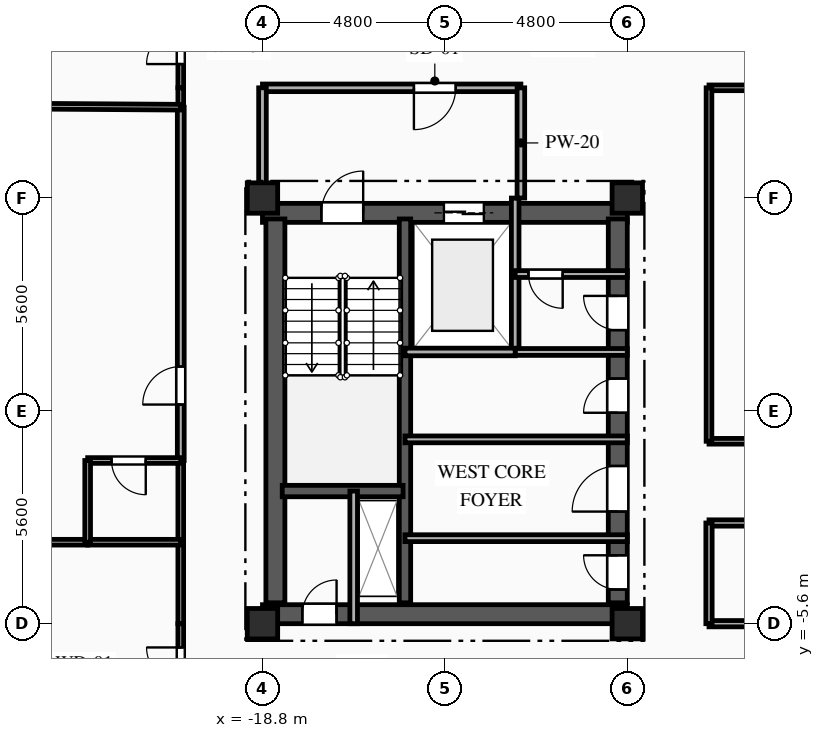
"""IFC4 building model, lengths in metres.
Left out: names, types, materials, properties, quantities, classifications, styles, units other than length and angle.
Written with IfcOpenShell. Run it as: python <this file> out.ifc"""

import sys

from ifc_helpers import new_model, si_unit, direction, frame, frame_2d, origin, origin_2d, place, context, subcontext, project, spatial, rectangle, extrude, element, fill, save


model = new_model("IFC4")
c1 = context("Model", 3, precision=1e-05, world=origin(), true_north=direction((0.0, 1.0)))
c2 = subcontext(c1, "Body", "Model", "MODEL_VIEW")
j1 = project(units=[si_unit("LENGTHUNIT", "METRE"), si_unit("PLANEANGLEUNIT", "RADIAN")], contexts=[c1])
p1 = place(None, origin())
s1 = spatial("IfcSite", under=j1, at=p1, CompositionType="ELEMENT")
p2 = place(p1, origin())
s2 = spatial("IfcBuilding", under=s1, at=p2, CompositionType="ELEMENT")
p3 = place(p2, frame((0.0, 0.0, 206.45)))
s3 = spatial("IfcBuildingStorey", under=s2, at=p3, CompositionType="ELEMENT", Elevation=206.45)
for number, where, z_axis, x_axis in (
    (1, (-18.8, -5.6, 0.0), (0.0, 0.0, 1.0), (1.0, 0.0, 0.0)),
    (2, (-18.8, 5.6, 0.0), (0.0, 0.0, 1.0), (1.0, 0.0, 0.0)),
    (3, (-9.2, -5.6, 0.0), (0.0, 0.0, 1.0), (1.0, 0.0, 0.0)),
    (4, (-9.2, 5.6, 0.0), (0.0, 0.0, 1.0), (1.0, 0.0, 0.0)),
):
    element("IfcColumn", number, at=place(p3, frame(where, z_axis=z_axis, x_axis=x_axis)), inside=s3, PredefinedType="COLUMN", context=c2, shape_type="SweptSolid", body=[
        extrude(rectangle(XDim=0.8, YDim=0.8, at=origin_2d()), origin(), (0.0, 0.0, 1.0), 3.35),
    ])
p4 = place(p3, frame((-18.8, 5.21, 0.0), z_axis=(0.0, 0.0, 1.0), x_axis=(1.0, 0.0, 0.0)))
e5 = element("IfcWall", 5, at=p4, inside=s3, PredefinedType="SHEAR", context=c2, shape_type="SweptSolid", body=[
    extrude(rectangle(XDim=9.6, YDim=0.5, at=frame_2d((4.8, 0.0))), origin(), (0.0, 0.0, 1.0), 3.04),
])
p5 = place(p4, frame((1.55, 0.0, 0.0)))
e6 = element("IfcOpeningElement", 6, at=p5, cuts=e5, PredefinedType="OPENING", context=c2, shape_type="SweptSolid", body=[
    extrude(rectangle(XDim=1.1, YDim=2.15, at=frame_2d((0.55, 1.075))), frame((0.0, 0.26, 0.0), z_axis=(0.0, -1.0, 0.0), x_axis=(1.0, 0.0, 0.0)), (0.0, 0.0, 1.0), 0.52),
])
p6 = place(p4, frame((4.775, 0.0, 0.0)))
e7 = element("IfcOpeningElement", 7, at=p6, cuts=e5, PredefinedType="OPENING", context=c2, shape_type="SweptSolid", body=[
    extrude(rectangle(XDim=1.05, YDim=2.1, at=frame_2d((0.525, 1.05))), frame((0.0, 0.26, 0.0), z_axis=(0.0, -1.0, 0.0), x_axis=(1.0, 0.0, 0.0)), (0.0, 0.0, 1.0), 0.52),
])
p7 = place(p3, frame((-18.8, -5.35, 0.0), z_axis=(0.0, 0.0, 1.0), x_axis=(1.0, 0.0, 0.0)))
e8 = element("IfcWall", 8, at=p7, inside=s3, PredefinedType="SHEAR", context=c2, shape_type="SweptSolid", body=[
    extrude(rectangle(XDim=9.6, YDim=0.5, at=frame_2d((4.8, 0.0))), origin(), (0.0, 0.0, 1.0), 3.04),
])
p8 = place(p7, frame((1.05, 0.0, 0.0)))
e9 = element("IfcOpeningElement", 9, at=p8, cuts=e8, PredefinedType="OPENING", context=c2, shape_type="SweptSolid", body=[
    extrude(rectangle(XDim=0.9, YDim=2.1, at=frame_2d((0.45, 1.05))), frame((0.0, 0.26, 0.0), z_axis=(0.0, -1.0, 0.0), x_axis=(1.0, 0.0, 0.0)), (0.0, 0.0, 1.0), 0.52),
])
p9 = place(p3, frame((-18.46, -5.05, 0.0), z_axis=(0.0, 0.0, 1.0), x_axis=(0.0, 1.0, 0.0)))
e10 = element("IfcWall", 10, at=p9, inside=s3, PredefinedType="SHEAR", context=c2, shape_type="SweptSolid", body=[
    extrude(rectangle(XDim=10.1, YDim=0.5, at=frame_2d((5.05, 0.0))), origin(), (0.0, 0.0, 1.0), 3.04),
])
p10 = place(p3, frame((-9.45, -5.05, 0.0), z_axis=(0.0, 0.0, 1.0), x_axis=(0.0, 1.0, 0.0)))
e11 = element("IfcWall", 11, at=p10, inside=s3, PredefinedType="SHEAR", context=c2, shape_type="SweptSolid", body=[
    extrude(rectangle(XDim=10.1, YDim=0.5, at=frame_2d((5.05, 0.0))), origin(), (0.0, 0.0, 1.0), 3.04),
])
p11 = place(p10, frame((7.175, 0.0, 0.0)))
e12 = element("IfcOpeningElement", 12, at=p11, cuts=e11, PredefinedType="OPENING", context=c2, shape_type="SweptSolid", body=[
    extrude(rectangle(XDim=0.9, YDim=2.1, at=frame_2d((0.45, 1.05))), frame((0.0, 0.26, 0.0), z_axis=(0.0, -1.0, 0.0), x_axis=(1.0, 0.0, 0.0)), (0.0, 0.0, 1.0), 0.52),
])
p12 = place(p10, frame((2.4, 0.0, 0.0)))
e13 = element("IfcOpeningElement", 13, at=p12, cuts=e11, PredefinedType="OPENING", context=c2, shape_type="SweptSolid", body=[
    extrude(rectangle(XDim=1.2, YDim=2.15, at=frame_2d((0.6, 1.075))), frame((0.0, 0.26, 0.0), z_axis=(0.0, -1.0, 0.0), x_axis=(1.0, 0.0, 0.0)), (0.0, 0.0, 1.0), 0.52),
])
p13 = place(p10, frame((0.35, 0.0, 0.0)))
e14 = element("IfcOpeningElement", 14, at=p13, cuts=e11, PredefinedType="OPENING", context=c2, shape_type="SweptSolid", body=[
    extrude(rectangle(XDim=0.9, YDim=2.1, at=frame_2d((0.45, 1.05))), frame((0.0, 0.26, 0.0), z_axis=(0.0, -1.0, 0.0), x_axis=(1.0, 0.0, 0.0)), (0.0, 0.0, 1.0), 0.52),
])
p14 = place(p10, frame((5.0, 0.0, 0.0)))
e15 = element("IfcOpeningElement", 15, at=p14, cuts=e11, PredefinedType="OPENING", context=c2, shape_type="SweptSolid", body=[
    extrude(rectangle(XDim=0.9, YDim=2.1, at=frame_2d((0.45, 1.05))), frame((0.0, 0.26, 0.0), z_axis=(0.0, -1.0, 0.0), x_axis=(1.0, 0.0, 0.0)), (0.0, 0.0, 1.0), 0.52),
])
p15 = place(p3, frame((-15.05, -5.05, 0.0), z_axis=(0.0, 0.0, 1.0), x_axis=(0.0, 1.0, 0.0)))
e16 = element("IfcWall", 16, at=p15, inside=s3, PredefinedType="SHEAR", context=c2, shape_type="SweptSolid", body=[
    extrude(rectangle(XDim=10.1, YDim=0.3, at=frame_2d((5.05, 0.0))), origin(), (0.0, 0.0, 1.0), 3.04),
])
p16 = place(p3, frame((-18.28, -2.11, 0.0), z_axis=(0.0, 0.0, 1.0), x_axis=(1.0, 0.0, 0.0)))
e17 = element("IfcWall", 17, at=p16, inside=s3, PredefinedType="SHEAR", context=c2, shape_type="SweptSolid", body=[
    extrude(rectangle(XDim=3.18, YDim=0.3, at=frame_2d((1.59, 0.0))), origin(), (0.0, 0.0, 1.0), 3.04),
])
p17 = place(p3, frame((-16.4, -5.6, 0.0), z_axis=(0.0, 0.0, 1.0), x_axis=(0.0, 1.0, 0.0)))
e18 = element("IfcWall", 18, at=p17, inside=s3, PredefinedType="PARTITIONING", context=c2, shape_type="SweptSolid", body=[
    extrude(rectangle(XDim=3.49, YDim=0.2, at=frame_2d((1.745, 0.0))), origin(), (0.0, 0.0, 1.0), 3.04),
])
p18 = place(p3, frame((-12.15, 1.55, 0.0), z_axis=(0.0, 0.0, 1.0), x_axis=(0.0, 1.0, 0.0)))
e19 = element("IfcWall", 19, at=p18, inside=s3, PredefinedType="PARTITIONING", context=c2, shape_type="SweptSolid", body=[
    extrude(rectangle(XDim=2.05, YDim=0.2, at=frame_2d((1.025, 0.0))), origin(), (0.0, 0.0, 1.0), 3.04),
])
p19 = place(p3, frame((-12.15, 3.6, 0.0), z_axis=(0.0, 0.0, 1.0), x_axis=(0.0, 1.0, 0.0)))
e20 = element("IfcWall", 20, at=p19, inside=s3, PredefinedType="PARTITIONING", context=c2, shape_type="SweptSolid", body=[
    extrude(rectangle(XDim=2.0, YDim=0.2, at=frame_2d((1.0, 0.0))), origin(), (0.0, 0.0, 1.0), 3.04),
])
p20 = place(p3, frame((-12.0, 8.5, 0.0), z_axis=(0.0, 0.0, 1.0), x_axis=(-1.0, 0.0, 0.0)))
e21 = element("IfcWall", 21, at=p20, inside=s3, PredefinedType="PARTITIONING", context=c2, shape_type="SweptSolid", body=[
    extrude(rectangle(XDim=6.8, YDim=0.2, at=frame_2d((3.4, 0.0))), origin(), (0.0, 0.0, 1.0), 3.04),
])
p21 = place(p20, frame((1.715, 0.0, 0.0)))
e22 = element("IfcOpeningElement", 22, at=p21, cuts=e21, PredefinedType="OPENING", context=c2, shape_type="SweptSolid", body=[
    extrude(rectangle(XDim=1.1, YDim=2.15, at=frame_2d((0.55, 1.075))), frame((0.0, 0.11, 0.0), z_axis=(0.0, -1.0, 0.0), x_axis=(1.0, 0.0, 0.0)), (0.0, 0.0, 1.0), 0.22),
])
p22 = place(p3, frame((-18.8, 8.5, 0.0), z_axis=(0.0, 0.0, 1.0), x_axis=(0.0, -1.0, 0.0)))
e23 = element("IfcWall", 23, at=p22, inside=s3, PredefinedType="PARTITIONING", context=c2, shape_type="SweptSolid", body=[
    extrude(rectangle(XDim=2.9, YDim=0.2, at=frame_2d((1.45, 0.0))), origin(), (0.0, 0.0, 1.0), 2.665),
])
p23 = place(p3, frame((-12.0, 5.6, 0.0), z_axis=(0.0, 0.0, 1.0), x_axis=(0.0, 1.0, 0.0)))
e24 = element("IfcWall", 24, at=p23, inside=s3, PredefinedType="PARTITIONING", context=c2, shape_type="SweptSolid", body=[
    extrude(rectangle(XDim=2.9, YDim=0.2, at=frame_2d((1.45, 0.0))), origin(), (0.0, 0.0, 1.0), 3.04),
])
p24 = place(p3, frame((-9.2, 3.6, 0.0), z_axis=(0.0, 0.0, 1.0), x_axis=(-1.0, 0.0, 0.0)))
e25 = element("IfcWall", 25, at=p24, inside=s3, PredefinedType="PARTITIONING", context=c2, shape_type="SweptSolid", body=[
    extrude(rectangle(XDim=2.95, YDim=0.18, at=frame_2d((1.475, 0.0))), origin(), (0.0, 0.0, 1.0), 3.04),
])
p25 = place(p24, frame((1.7, 0.0, 0.0)))
e26 = element("IfcOpeningElement", 26, at=p25, cuts=e25, PredefinedType="OPENING", context=c2, shape_type="SweptSolid", body=[
    extrude(rectangle(XDim=0.9, YDim=2.1, at=frame_2d((0.45, 1.05))), frame((0.0, 0.1, 0.0), z_axis=(0.0, -1.0, 0.0), x_axis=(1.0, 0.0, 0.0)), (0.0, 0.0, 1.0), 0.2),
])
p26 = place(p3, frame((-12.15, 1.55, 0.0), z_axis=(0.0, 0.0, 1.0), x_axis=(1.0, 0.0, 0.0)))
e27 = element("IfcWall", 27, at=p26, inside=s3, PredefinedType="PARTITIONING", context=c2, shape_type="SweptSolid", body=[
    extrude(rectangle(XDim=2.95, YDim=0.18, at=frame_2d((1.475, 0.0))), origin(), (0.0, 0.0, 1.0), 3.04),
])
p27 = place(p3, frame((-15.05, -3.35, 0.0), z_axis=(0.0, 0.0, 1.0), x_axis=(1.0, 0.0, 0.0)))
e28 = element("IfcWall", 28, at=p27, inside=s3, PredefinedType="PARTITIONING", context=c2, shape_type="SweptSolid", body=[
    extrude(rectangle(XDim=5.85, YDim=0.18, at=frame_2d((2.925, 0.0))), origin(), (0.0, 0.0, 1.0), 2.755),
])
p28 = place(p3, frame((-9.2, -0.75, 0.0), z_axis=(0.0, 0.0, 1.0), x_axis=(-1.0, 0.0, 0.0)))
e29 = element("IfcWall", 29, at=p28, inside=s3, PredefinedType="PARTITIONING", context=c2, shape_type="SweptSolid", body=[
    extrude(rectangle(XDim=5.85, YDim=0.18, at=frame_2d((2.925, 0.0))), origin(), (0.0, 0.0, 1.0), 3.04),
])
p29 = place(p3, frame((-20.95, 8.5, 0.0), z_axis=(0.0, 0.0, 1.0), x_axis=(0.0, 1.0, 0.0)))
e30 = element("IfcWall", 30, at=p29, inside=s3, PredefinedType="PARTITIONING", context=c2, shape_type="SweptSolid", body=[
    extrude(rectangle(XDim=2.15, YDim=0.15, at=frame_2d((1.075, 0.0))), origin(), (0.0, 0.0, 1.0), 3.04),
])
p30 = place(p29, frame((0.625, 0.0, 0.0)))
e31 = element("IfcOpeningElement", 31, at=p30, cuts=e30, PredefinedType="OPENING", context=c2, shape_type="SweptSolid", body=[
    extrude(rectangle(XDim=0.9, YDim=2.1, at=frame_2d((0.45, 1.05))), frame((0.0, 0.085, 0.0), z_axis=(0.0, -1.0, 0.0), x_axis=(1.0, 0.0, 0.0)), (0.0, 0.0, 1.0), 0.17),
])
p31 = place(p3, frame((0.0, 8.5, 0.0), z_axis=(0.0, 0.0, 1.0), x_axis=(-1.0, 0.0, 0.0)))
e32 = element("IfcWall", 32, at=p31, inside=s3, PredefinedType="PARTITIONING", context=c2, shape_type="SweptSolid", body=[
    extrude(rectangle(XDim=7.05, YDim=0.15, at=frame_2d((3.525, 0.0))), origin(), (0.0, 0.0, 1.0), 3.04),
])
p32 = place(p3, frame((-20.95, -7.75, 0.0), z_axis=(0.0, 0.0, 1.0), x_axis=(0.0, 1.0, 0.0)))
e33 = element("IfcWall", 33, at=p32, inside=s3, PredefinedType="PARTITIONING", context=c2, shape_type="SweptSolid", body=[
    extrude(rectangle(XDim=2.15, YDim=0.15, at=frame_2d((1.075, 0.0))), origin(), (0.0, 0.0, 1.0), 3.04),
])
p33 = place(p32, frame((0.625, 0.0, 0.0)))
e34 = element("IfcOpeningElement", 34, at=p33, cuts=e33, PredefinedType="OPENING", context=c2, shape_type="SweptSolid", body=[
    extrude(rectangle(XDim=0.9, YDim=2.1, at=frame_2d((0.45, 1.05))), frame((0.0, 0.085, 0.0), z_axis=(0.0, -1.0, 0.0), x_axis=(1.0, 0.0, 0.0)), (0.0, 0.0, 1.0), 0.17),
])
p34 = place(p3, frame((-7.05, -5.6, 0.0), z_axis=(0.0, 0.0, 1.0), x_axis=(1.0, 0.0, 0.0)))
e35 = element("IfcWall", 35, at=p34, inside=s3, PredefinedType="PARTITIONING", context=c2, shape_type="SweptSolid", body=[
    extrude(rectangle(XDim=7.05, YDim=0.165, at=frame_2d((3.525, 0.0))), origin(), (0.0, 0.0, 1.0), 2.525),
])
p35 = place(p3, frame((-20.95, -5.6, 0.0), z_axis=(0.0, 0.0, 1.0), x_axis=(0.0, 1.0, 0.0)))
e36 = element("IfcWall", 36, at=p35, inside=s3, PredefinedType="PARTITIONING", context=c2, shape_type="SweptSolid", body=[
    extrude(rectangle(XDim=2.144, YDim=0.15, at=frame_2d((1.072, 0.0))), origin(), (0.0, 0.0, 1.0), 3.04),
])
p36 = place(p3, frame((-20.95, -1.306, 0.0), z_axis=(0.0, 0.0, 1.0), x_axis=(0.0, 1.0, 0.0)))
e37 = element("IfcWall", 37, at=p36, inside=s3, PredefinedType="PARTITIONING", context=c2, shape_type="SweptSolid", body=[
    extrude(rectangle(XDim=9.296, YDim=0.18, at=frame_2d((4.648, 0.0))), origin(), (0.0, 0.0, 1.0), 3.04),
])
p37 = place(p36, frame((1.472, 0.0, 0.0)))
e38 = element("IfcOpeningElement", 38, at=p37, cuts=e37, PredefinedType="OPENING", context=c2, shape_type="SweptSolid", body=[
    extrude(rectangle(XDim=1.0, YDim=2.15, at=frame_2d((0.5, 1.075))), frame((0.0, 0.1, 0.0), z_axis=(0.0, -1.0, 0.0), x_axis=(1.0, 0.0, 0.0)), (0.0, 0.0, 1.0), 0.2),
])
p38 = place(p3, frame((-20.95, -3.456, 0.0), z_axis=(0.0, 0.0, 1.0), x_axis=(0.0, 1.0, 0.0)))
e39 = element("IfcWall", 39, at=p38, inside=s3, PredefinedType="PLUMBINGWALL", context=c2, shape_type="SweptSolid", body=[
    extrude(rectangle(XDim=2.15, YDim=0.15, at=frame_2d((1.075, 0.0))), origin(), (0.0, 0.0, 1.0), 3.04),
])
p39 = place(p3, frame((-20.95, 7.99, 0.0), z_axis=(0.0, 0.0, 1.0), x_axis=(0.0, 1.0, 0.0)))
e40 = element("IfcWall", 40, at=p39, inside=s3, PredefinedType="PARTITIONING", context=c2, shape_type="SweptSolid", body=[
    extrude(rectangle(XDim=0.51, YDim=0.15, at=frame_2d((0.255, 0.0))), origin(), (0.0, 0.0, 1.0), 3.04),
])
p40 = place(p3, frame((-7.05, -0.8, 0.0), z_axis=(0.0, 0.0, 1.0), x_axis=(1.0, 0.0, 0.0)))
e41 = element("IfcWall", 41, at=p40, inside=s3, PredefinedType="PARTITIONING", context=c2, shape_type="SweptSolid", body=[
    extrude(rectangle(XDim=14.1, YDim=0.15, at=frame_2d((7.05, 0.0))), origin(), (0.0, 0.0, 1.0), 3.04),
])
p41 = place(p40, frame((6.525, 0.0, 0.0)))
e42 = element("IfcOpeningElement", 42, at=p41, cuts=e41, PredefinedType="OPENING", context=c2, shape_type="SweptSolid", body=[
    extrude(rectangle(XDim=1.05, YDim=2.15, at=frame_2d((0.525, 1.075))), frame((0.0, 0.085, 0.0), z_axis=(0.0, -1.0, 0.0), x_axis=(1.0, 0.0, 0.0)), (0.0, 0.0, 1.0), 0.17),
])
p42 = place(p3, frame((7.05, -2.95, 0.0), z_axis=(0.0, 0.0, 1.0), x_axis=(-1.0, 0.0, 0.0)))
e43 = element("IfcWall", 43, at=p42, inside=s3, PredefinedType="PARTITIONING", context=c2, shape_type="SweptSolid", body=[
    extrude(rectangle(XDim=14.1, YDim=0.165, at=frame_2d((7.05, 0.0))), origin(), (0.0, 0.0, 1.0), 3.04),
])
p43 = place(p42, frame((6.475, 0.0, 0.0)))
e44 = element("IfcOpeningElement", 44, at=p43, cuts=e43, PredefinedType="OPENING", context=c2, shape_type="SweptSolid", body=[
    extrude(rectangle(XDim=1.15, YDim=2.15, at=frame_2d((0.575, 1.075))), frame((0.0, 0.093, 0.0), z_axis=(0.0, -1.0, 0.0), x_axis=(1.0, 0.0, 0.0)), (0.0, 0.0, 1.0), 0.185),
])
p44 = place(p3, frame((-7.05, 8.5, 0.0), z_axis=(0.0, 0.0, 1.0), x_axis=(0.0, -1.0, 0.0)))
e45 = element("IfcWall", 45, at=p44, inside=s3, PredefinedType="PARTITIONING", context=c2, shape_type="SweptSolid", body=[
    extrude(rectangle(XDim=9.3, YDim=0.15, at=frame_2d((4.65, 0.0))), origin(), (0.0, 0.0, 1.0), 3.04),
])
p45 = place(p3, frame((-7.05, -2.95, 0.0), z_axis=(0.0, 0.0, 1.0), x_axis=(0.0, -1.0, 0.0)))
e46 = element("IfcWall", 46, at=p45, inside=s3, PredefinedType="PARTITIONING", context=c2, shape_type="SweptSolid", body=[
    extrude(rectangle(XDim=2.65, YDim=0.165, at=frame_2d((1.325, 0.0))), origin(), (0.0, 0.0, 1.0), 3.04),
])
p46 = place(p3, frame((-24.976, -3.456, 0.0), z_axis=(0.0, 0.0, 1.0), x_axis=(1.0, 0.0, 0.0)))
e47 = element("IfcWall", 47, at=p46, inside=s3, PredefinedType="PARTITIONING", context=c2, shape_type="SweptSolid", body=[
    extrude(rectangle(XDim=1.576, YDim=0.15, at=frame_2d((0.788, 0.0))), origin(), (0.0, 0.0, 1.0), 3.04),
])
p47 = place(p3, frame((-23.4, -3.456, 0.0), z_axis=(0.0, 0.0, 1.0), x_axis=(1.0, 0.0, 0.0)))
e48 = element("IfcWall", 48, at=p47, inside=s3, PredefinedType="PLUMBINGWALL", context=c2, shape_type="SweptSolid", body=[
    extrude(rectangle(XDim=2.45, YDim=0.15, at=frame_2d((1.225, 0.0))), origin(), (0.0, 0.0, 1.0), 3.04),
])
p48 = place(p3, frame((-20.95, -1.306, 0.0), z_axis=(0.0, 0.0, 1.0), x_axis=(-1.0, 0.0, 0.0)))
e49 = element("IfcWall", 49, at=p48, inside=s3, PredefinedType="PLUMBINGWALL", context=c2, shape_type="SweptSolid", body=[
    extrude(rectangle(XDim=2.45, YDim=0.15, at=frame_2d((1.225, 0.0))), origin(), (0.0, 0.0, 1.0), 3.04),
])
p49 = place(p48, frame((0.921, 0.0, 0.0)))
e50 = element("IfcOpeningElement", 50, at=p49, cuts=e49, PredefinedType="OPENING", context=c2, shape_type="SweptSolid", body=[
    extrude(rectangle(XDim=0.9, YDim=2.1, at=frame_2d((0.45, 1.05))), frame((0.0, 0.085, 0.0), z_axis=(0.0, -1.0, 0.0), x_axis=(1.0, 0.0, 0.0)), (0.0, 0.0, 1.0), 0.17),
])
p50 = place(p3, frame((-23.4, -1.306, 0.0), z_axis=(0.0, 0.0, 1.0), x_axis=(0.0, -1.0, 0.0)))
e51 = element("IfcWall", 51, at=p50, inside=s3, PredefinedType="PLUMBINGWALL", context=c2, shape_type="SweptSolid", body=[
    extrude(rectangle(XDim=2.15, YDim=0.15, at=frame_2d((1.075, 0.0))), origin(), (0.0, 0.0, 1.0), 2.695),
])
p51 = place(p3, frame((-27.419, 8.034, 0.0), z_axis=(0.0, 0.0, 1.0), x_axis=(0.999976928608, -0.006792808784, 0.0)))
e52 = element("IfcWall", 52, at=p51, inside=s3, PredefinedType="PARTITIONING", context=c2, shape_type="SweptSolid", body=[
    extrude(rectangle(XDim=6.469, YDim=0.15, at=frame_2d((3.235, 0.0))), origin(), (0.0, 0.0, 1.0), 3.04),
])
p52 = place(p3, frame((-15.05, 1.55, 0.0), z_axis=(0.0, 0.0, 1.0), x_axis=(1.0, 0.0, 0.0)))
e53 = element("IfcWall", 53, at=p52, inside=s3, PredefinedType="PARTITIONING", context=c2, shape_type="SweptSolid", body=[
    extrude(rectangle(XDim=2.9, YDim=0.2, at=frame_2d((1.45, 0.0))), origin(), (0.0, 0.0, 1.0), 3.04),
])
p53 = place(p5, origin())
e54 = element("IfcDoor", 54, at=p53, inside=s3, OperationType="SINGLE_SWING_RIGHT", PredefinedType="DOOR", context=c2, shape_type="SweptSolid", body=[
    extrude(rectangle(XDim=1.1, YDim=2.15, at=frame_2d((0.55, 1.075))), frame((0.0, 0.025, 0.0), z_axis=(0.0, -1.0, 0.0), x_axis=(1.0, 0.0, 0.0)), (0.0, 0.0, 1.0), 0.05),
])
fill(e6, e54)
p54 = place(p6, origin())
e55 = element("IfcDoor", 55, at=p54, inside=s3, OperationType="DOUBLE_DOOR_SLIDING", PredefinedType="DOOR", context=c2, shape_type="SweptSolid", body=[
    extrude(rectangle(XDim=1.05, YDim=2.1, at=frame_2d((0.525, 1.05))), frame((0.0, 0.025, 0.0), z_axis=(0.0, -1.0, 0.0), x_axis=(1.0, 0.0, 0.0)), (0.0, 0.0, 1.0), 0.05),
])
fill(e7, e55)
p55 = place(p8, origin())
e56 = element("IfcDoor", 56, at=p55, inside=s3, OperationType="SINGLE_SWING_RIGHT", PredefinedType="DOOR", context=c2, shape_type="SweptSolid", body=[
    extrude(rectangle(XDim=0.9, YDim=2.1, at=frame_2d((0.45, 1.05))), frame((0.0, 0.025, 0.0), z_axis=(0.0, -1.0, 0.0), x_axis=(1.0, 0.0, 0.0)), (0.0, 0.0, 1.0), 0.05),
])
fill(e9, e56)
p56 = place(p21, origin())
e57 = element("IfcDoor", 57, at=p56, inside=s3, OperationType="SINGLE_SWING_RIGHT", PredefinedType="DOOR", context=c2, shape_type="SweptSolid", body=[
    extrude(rectangle(XDim=1.1, YDim=2.15, at=frame_2d((0.55, 1.075))), frame((0.0, 0.025, 0.0), z_axis=(0.0, -1.0, 0.0), x_axis=(1.0, 0.0, 0.0)), (0.0, 0.0, 1.0), 0.05),
])
fill(e22, e57)
p57 = place(p25, origin())
e58 = element("IfcDoor", 58, at=p57, inside=s3, OperationType="SINGLE_SWING_LEFT", PredefinedType="DOOR", context=c2, shape_type="SweptSolid", body=[
    extrude(rectangle(XDim=0.9, YDim=2.1, at=frame_2d((0.45, 1.05))), frame((0.0, 0.025, 0.0), z_axis=(0.0, -1.0, 0.0), x_axis=(1.0, 0.0, 0.0)), (0.0, 0.0, 1.0), 0.05),
])
fill(e26, e58)
p58 = place(p11, origin())
e59 = element("IfcDoor", 59, at=p58, inside=s3, OperationType="SINGLE_SWING_RIGHT", PredefinedType="DOOR", context=c2, shape_type="SweptSolid", body=[
    extrude(rectangle(XDim=0.9, YDim=2.1, at=frame_2d((0.45, 1.05))), frame((0.0, 0.025, 0.0), z_axis=(0.0, -1.0, 0.0), x_axis=(1.0, 0.0, 0.0)), (0.0, 0.0, 1.0), 0.05),
])
fill(e12, e59)
p59 = place(p12, origin())
e60 = element("IfcDoor", 60, at=p59, inside=s3, OperationType="SINGLE_SWING_LEFT", PredefinedType="DOOR", context=c2, shape_type="SweptSolid", body=[
    extrude(rectangle(XDim=1.2, YDim=2.15, at=frame_2d((0.6, 1.075))), frame((0.0, 0.025, 0.0), z_axis=(0.0, -1.0, 0.0), x_axis=(1.0, 0.0, 0.0)), (0.0, 0.0, 1.0), 0.05),
])
fill(e13, e60)
p60 = place(p13, origin())
e61 = element("IfcDoor", 61, at=p60, inside=s3, OperationType="SINGLE_SWING_RIGHT", PredefinedType="DOOR", context=c2, shape_type="SweptSolid", body=[
    extrude(rectangle(XDim=0.9, YDim=2.1, at=frame_2d((0.45, 1.05))), frame((0.0, 0.025, 0.0), z_axis=(0.0, -1.0, 0.0), x_axis=(1.0, 0.0, 0.0)), (0.0, 0.0, 1.0), 0.05),
])
fill(e14, e61)
p61 = place(p14, origin())
e62 = element("IfcDoor", 62, at=p61, inside=s3, OperationType="SINGLE_SWING_LEFT", PredefinedType="DOOR", context=c2, shape_type="SweptSolid", body=[
    extrude(rectangle(XDim=0.9, YDim=2.1, at=frame_2d((0.45, 1.05))), frame((0.0, 0.025, 0.0), z_axis=(0.0, -1.0, 0.0), x_axis=(1.0, 0.0, 0.0)), (0.0, 0.0, 1.0), 0.05),
])
fill(e15, e62)
p62 = place(p30, origin())
e63 = element("IfcDoor", 63, at=p62, inside=s3, OperationType="SINGLE_SWING_LEFT", PredefinedType="DOOR", context=c2, shape_type="SweptSolid", body=[
    extrude(rectangle(XDim=0.9, YDim=2.1, at=frame_2d((0.45, 1.05))), frame((0.0, 0.025, 0.0), z_axis=(0.0, -1.0, 0.0), x_axis=(1.0, 0.0, 0.0)), (0.0, 0.0, 1.0), 0.05),
])
fill(e31, e63)
p63 = place(p33, origin())
e64 = element("IfcDoor", 64, at=p63, inside=s3, OperationType="SINGLE_SWING_RIGHT", PredefinedType="DOOR", context=c2, shape_type="SweptSolid", body=[
    extrude(rectangle(XDim=0.9, YDim=2.1, at=frame_2d((0.45, 1.05))), frame((0.0, 0.025, 0.0), z_axis=(0.0, -1.0, 0.0), x_axis=(1.0, 0.0, 0.0)), (0.0, 0.0, 1.0), 0.05),
])
fill(e34, e64)
p64 = place(p37, origin())
e65 = element("IfcDoor", 65, at=p64, inside=s3, OperationType="SINGLE_SWING_LEFT", PredefinedType="DOOR", context=c2, shape_type="SweptSolid", body=[
    extrude(rectangle(XDim=1.0, YDim=2.15, at=frame_2d((0.5, 1.075))), frame((0.0, 0.025, 0.0), z_axis=(0.0, -1.0, 0.0), x_axis=(1.0, 0.0, 0.0)), (0.0, 0.0, 1.0), 0.05),
])
fill(e38, e65)
p65 = place(p49, origin())
e66 = element("IfcDoor", 66, at=p65, inside=s3, OperationType="SINGLE_SWING_LEFT", PredefinedType="DOOR", context=c2, shape_type="SweptSolid", body=[
    extrude(rectangle(XDim=0.9, YDim=2.1, at=frame_2d((0.45, 1.05))), frame((0.0, 0.025, 0.0), z_axis=(0.0, -1.0, 0.0), x_axis=(1.0, 0.0, 0.0)), (0.0, 0.0, 1.0), 0.05),
])
fill(e50, e66)
save(model, sys.argv[1])
